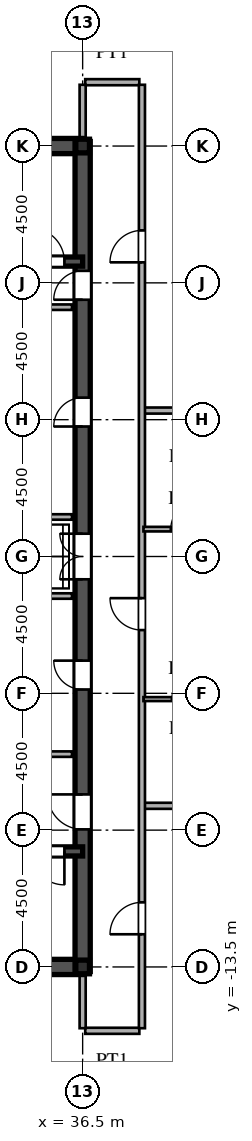
"""IFC4 building model, lengths in metres.
Left out: names, types, materials, properties, quantities, classifications, styles, units other than length and angle.
Written with IfcOpenShell. Run it as: python <this file> out.ifc"""

import sys

from ifc_helpers import new_model, si_unit, direction, frame, frame_2d, origin, origin_2d, place, context, subcontext, project, spatial, rectangle, i_section, extrude, source, transform, mapped, element, fill, save


model = new_model("IFC4")
c1 = context("Model", 3, precision=1e-05, world=origin(), true_north=direction((0.0, 1.0)))
c2 = subcontext(c1, "Body", "Model", "MODEL_VIEW")
j1 = project(units=[si_unit("LENGTHUNIT", "METRE"), si_unit("PLANEANGLEUNIT", "RADIAN")], contexts=[c1])
p1 = place(None, origin())
s1 = spatial("IfcSite", under=j1, at=p1, CompositionType="ELEMENT")
p2 = place(p1, origin())
s2 = spatial("IfcBuilding", under=s1, at=p2, CompositionType="ELEMENT")
p3 = place(p2, frame((0.0, 0.0, 246.9)))
s3 = spatial("IfcBuildingStorey", under=s2, at=p3, CompositionType="ELEMENT", Elevation=246.9)
m1 = source(origin(), c2, "Body", "SweptSolid", [
    extrude(i_section(OverallWidth=0.45, OverallDepth=0.45, WebThickness=0.016, FlangeThickness=0.025, at=origin_2d()), origin(), (0.0, 0.0, 1.0), 3.75),
])
for number, where, z_axis, x_axis in (
    (1, (36.5, -13.5, 0.0), (0.0, 0.0, 1.0), (1.0, 0.0, 0.0)),
    (2, (36.5, 13.5, 0.0), (0.0, 0.0, 1.0), (1.0, 0.0, 0.0)),
):
    element("IfcColumn", number, at=place(p3, frame(where, z_axis=z_axis, x_axis=x_axis)), inside=s3, PredefinedType="COLUMN", context=c2, shape_type="MappedRepresentation", body=[
        mapped(m1, transform((0.0, 0.0, 0.0), scale=1.0)),
    ])
for number, where, z_axis, x_axis in (
    (3, (27.5, -13.5, 0.0), (0.0, 0.0, 1.0), (1.0, 0.0, 0.0)),
    (4, (27.5, 13.5, 0.0), (0.0, 0.0, 1.0), (1.0, 0.0, 0.0)),
):
    element("IfcWall", number, at=place(p3, frame(where, z_axis=z_axis, x_axis=x_axis)), inside=s3, PredefinedType="SHEAR", context=c2, shape_type="SweptSolid", body=[
        extrude(rectangle(XDim=9.0, YDim=0.5, at=frame_2d((4.5, 0.0))), origin(), (0.0, 0.0, 1.0), 3.53),
    ])
p4 = place(p3, frame((36.5, -13.65, 0.0), z_axis=(0.0, 0.0, 1.0), x_axis=(0.0, 1.0, 0.0)))
e5 = element("IfcWall", 5, at=p4, inside=s3, PredefinedType="SHEAR", context=c2, shape_type="SweptSolid", body=[
    extrude(rectangle(XDim=7.15, YDim=0.5, at=frame_2d((3.575, 0.0))), origin(), (0.0, 0.0, 1.0), 3.53),
])
p5 = place(p4, frame((4.675, 0.0, 0.0)))
e6 = element("IfcOpeningElement", 6, at=p5, cuts=e5, PredefinedType="OPENING", context=c2, shape_type="SweptSolid", body=[
    extrude(rectangle(XDim=1.15, YDim=2.2, at=frame_2d((0.575, 1.1))), frame((0.0, 0.26, 0.0), z_axis=(0.0, -1.0, 0.0), x_axis=(1.0, 0.0, 0.0)), (0.0, 0.0, 1.0), 0.52),
])
p6 = place(p3, frame((36.5, -1.3, 0.0), z_axis=(0.0, 0.0, 1.0), x_axis=(0.0, 1.0, 0.0)))
e7 = element("IfcWall", 7, at=p6, inside=s3, PredefinedType="SHEAR", context=c2, shape_type="SweptSolid", body=[
    extrude(rectangle(XDim=2.6, YDim=0.5, at=frame_2d((1.3, 0.0))), origin(), (0.0, 0.0, 1.0), 3.53),
])
p7 = place(p6, frame((0.55, 0.0, 0.0)))
e8 = element("IfcOpeningElement", 8, at=p7, cuts=e7, PredefinedType="OPENING", context=c2, shape_type="SweptSolid", body=[
    extrude(rectangle(XDim=1.5, YDim=2.3, at=frame_2d((0.75, 1.15))), frame((0.0, 0.26, 0.0), z_axis=(0.0, -1.0, 0.0), x_axis=(1.0, 0.0, 0.0)), (0.0, 0.0, 1.0), 0.52),
])
p8 = place(p3, frame((36.5, 8.2, 0.0), z_axis=(0.0, 0.0, 1.0), x_axis=(0.0, 1.0, 0.0)))
e9 = element("IfcWall", 9, at=p8, inside=s3, PredefinedType="SHEAR", context=c2, shape_type="SweptSolid", body=[
    extrude(rectangle(XDim=5.45, YDim=0.5, at=frame_2d((2.725, 0.0))), origin(), (0.0, 0.0, 1.0), 3.53),
])
p9 = place(p8, frame((0.245, 0.0, 0.0)))
e10 = element("IfcOpeningElement", 10, at=p9, cuts=e9, PredefinedType="OPENING", context=c2, shape_type="SweptSolid", body=[
    extrude(rectangle(XDim=0.95, YDim=2.15, at=frame_2d((0.475, 1.075))), frame((0.0, 0.26, 0.0), z_axis=(0.0, -1.0, 0.0), x_axis=(1.0, 0.0, 0.0)), (0.0, 0.0, 1.0), 0.52),
])
p10 = place(p3, frame((36.5, -6.5, 0.0), z_axis=(0.0, 0.0, 1.0), x_axis=(0.0, 1.0, 0.0)))
e11 = element("IfcWall", 11, at=p10, inside=s3, PredefinedType="SHEAR", context=c2, shape_type="SweptSolid", body=[
    extrude(rectangle(XDim=5.2, YDim=0.5, at=frame_2d((2.6, 0.0))), origin(), (0.0, 0.0, 1.0), 3.53),
])
p11 = place(p10, frame((2.125, 0.0, 0.0)))
e12 = element("IfcOpeningElement", 12, at=p11, cuts=e11, PredefinedType="OPENING", context=c2, shape_type="SweptSolid", body=[
    extrude(rectangle(XDim=0.95, YDim=2.15, at=frame_2d((0.475, 1.075))), frame((0.0, 0.26, 0.0), z_axis=(0.0, -1.0, 0.0), x_axis=(1.0, 0.0, 0.0)), (0.0, 0.0, 1.0), 0.52),
])
p12 = place(p3, frame((36.5, 1.3, 0.0), z_axis=(0.0, 0.0, 1.0), x_axis=(0.0, 1.0, 0.0)))
e13 = element("IfcWall", 13, at=p12, inside=s3, PredefinedType="SHEAR", context=c2, shape_type="SweptSolid", body=[
    extrude(rectangle(XDim=6.9, YDim=0.5, at=frame_2d((3.45, 0.0))), origin(), (0.0, 0.0, 1.0), 3.53),
])
p13 = place(p12, frame((2.975, 0.0, 0.0)))
e14 = element("IfcOpeningElement", 14, at=p13, cuts=e13, PredefinedType="OPENING", context=c2, shape_type="SweptSolid", body=[
    extrude(rectangle(XDim=0.95, YDim=2.15, at=frame_2d((0.475, 1.075))), frame((0.0, 0.26, 0.0), z_axis=(0.0, -1.0, 0.0), x_axis=(1.0, 0.0, 0.0)), (0.0, 0.0, 1.0), 0.52),
])
p14 = place(p3, frame((27.5, -9.7, 0.0), z_axis=(0.0, 0.0, 1.0), x_axis=(1.0, 0.0, 0.0)))
e15 = element("IfcWall", 15, at=p14, inside=s3, PredefinedType="SHEAR", context=c2, shape_type="SweptSolid", body=[
    extrude(rectangle(XDim=9.0, YDim=0.3, at=frame_2d((4.5, 0.0))), origin(), (0.0, 0.0, 1.0), 3.53),
])
p15 = place(p14, frame((7.3, 0.0, 0.0)))
e16 = element("IfcOpeningElement", 16, at=p15, cuts=e15, PredefinedType="OPENING", context=c2, shape_type="SweptSolid", body=[
    extrude(rectangle(XDim=1.1, YDim=2.2, at=frame_2d((0.55, 1.1))), frame((0.0, 0.16, 0.0), z_axis=(0.0, -1.0, 0.0), x_axis=(1.0, 0.0, 0.0)), (0.0, 0.0, 1.0), 0.32),
])
p16 = place(p3, frame((27.5, 9.7, 0.0), z_axis=(0.0, 0.0, 1.0), x_axis=(1.0, 0.0, 0.0)))
e17 = element("IfcWall", 17, at=p16, inside=s3, PredefinedType="SHEAR", context=c2, shape_type="SweptSolid", body=[
    extrude(rectangle(XDim=9.0, YDim=0.3, at=frame_2d((4.5, 0.0))), origin(), (0.0, 0.0, 1.0), 3.53),
])
p17 = place(p16, frame((7.3, 0.0, 0.0)))
e18 = element("IfcOpeningElement", 18, at=p17, cuts=e17, PredefinedType="OPENING", context=c2, shape_type="SweptSolid", body=[
    extrude(rectangle(XDim=1.1, YDim=2.2, at=frame_2d((0.55, 1.1))), frame((0.0, 0.16, 0.0), z_axis=(0.0, -1.0, 0.0), x_axis=(1.0, 0.0, 0.0)), (0.0, 0.0, 1.0), 0.32),
])
for number, where, z_axis, x_axis in (
    (19, (30.45, -6.5, 0.0), (0.0, 0.0, 1.0), (1.0, 0.0, 0.0)),
    (20, (30.45, 8.2, 0.0), (0.0, 0.0, 1.0), (1.0, 0.0, 0.0)),
):
    element("IfcWall", number, at=place(p3, frame(where, z_axis=z_axis, x_axis=x_axis)), inside=s3, PredefinedType="PARTITIONING", context=c2, shape_type="SweptSolid", body=[
        extrude(rectangle(XDim=5.7, YDim=0.18, at=frame_2d((2.85, 0.0))), origin(), (0.0, 0.0, 1.0), 3.53),
    ])
for number, where, z_axis, x_axis in (
    (21, (33.2, -1.3, 0.0), (0.0, 0.0, 1.0), (1.0, 0.0, 0.0)),
    (22, (33.2, 1.3, 0.0), (0.0, 0.0, 1.0), (1.0, 0.0, 0.0)),
):
    element("IfcWall", number, at=place(p3, frame(where, z_axis=z_axis, x_axis=x_axis)), inside=s3, PredefinedType="PARTITIONING", context=c2, shape_type="SweptSolid", body=[
        extrude(rectangle(XDim=2.95, YDim=0.18, at=frame_2d((1.475, 0.0))), origin(), (0.0, 0.0, 1.0), 3.53),
    ])
p18 = place(p3, frame((36.585, -15.6, 0.0), z_axis=(0.0, 0.0, 1.0), x_axis=(1.0, 0.0, 0.0)))
e23 = element("IfcWall", 23, at=p18, inside=s3, PredefinedType="PARTITIONING", context=c2, shape_type="SweptSolid", body=[
    extrude(rectangle(XDim=1.78, YDim=0.2, at=frame_2d((0.89, 0.0))), origin(), (0.0, 0.0, 1.0), 3.53),
])
p19 = place(p3, frame((38.53, -8.2, 0.0), z_axis=(0.0, 0.0, 1.0), x_axis=(1.0, 0.0, 0.0)))
e24 = element("IfcWall", 24, at=p19, inside=s3, PredefinedType="PARTITIONING", context=c2, shape_type="SweptSolid", body=[
    extrude(rectangle(XDim=17.813, YDim=0.2, at=frame_2d((8.906, 0.0))), origin(), (0.0, 0.0, 1.0), 3.53),
])
p20 = place(p3, frame((38.5, -4.69, 0.0), z_axis=(0.0, 0.0, 1.0), x_axis=(1.0, 0.0, 0.0)))
e25 = element("IfcWall", 25, at=p20, inside=s3, PredefinedType="PARTITIONING", context=c2, shape_type="SweptSolid", body=[
    extrude(rectangle(XDim=2.75, YDim=0.13, at=frame_2d((1.375, 0.0))), origin(), (0.0, 0.0, 1.0), 3.53),
])
p21 = place(p20, frame((0.935, 0.0, 0.0)))
e26 = element("IfcOpeningElement", 26, at=p21, cuts=e25, PredefinedType="OPENING", context=c2, shape_type="SweptSolid", body=[
    extrude(rectangle(XDim=0.88, YDim=2.1, at=frame_2d((0.44, 1.05))), frame((0.0, 0.075, 0.0), z_axis=(0.0, -1.0, 0.0), x_axis=(1.0, 0.0, 0.0)), (0.0, 0.0, 1.0), 0.15),
])
p22 = place(p3, frame((38.5, 0.9, 0.0), z_axis=(0.0, 0.0, 1.0), x_axis=(1.0, 0.0, 0.0)))
e27 = element("IfcWall", 27, at=p22, inside=s3, PredefinedType="PARTITIONING", context=c2, shape_type="SweptSolid", body=[
    extrude(rectangle(XDim=2.75, YDim=0.15, at=frame_2d((1.375, 0.0))), origin(), (0.0, 0.0, 1.0), 3.53),
])
p23 = place(p22, frame((0.9, 0.0, 0.0)))
e28 = element("IfcOpeningElement", 28, at=p23, cuts=e27, PredefinedType="OPENING", context=c2, shape_type="SweptSolid", body=[
    extrude(rectangle(XDim=0.95, YDim=2.15, at=frame_2d((0.475, 1.075))), frame((0.0, 0.085, 0.0), z_axis=(0.0, -1.0, 0.0), x_axis=(1.0, 0.0, 0.0)), (0.0, 0.0, 1.0), 0.17),
])
p24 = place(p3, frame((38.53, 4.8, 0.0), z_axis=(0.0, 0.0, 1.0), x_axis=(1.0, 0.0, 0.0)))
e29 = element("IfcWall", 29, at=p24, inside=s3, PredefinedType="PARTITIONING", context=c2, shape_type="SweptSolid", body=[
    extrude(rectangle(XDim=23.48, YDim=0.2, at=frame_2d((11.74, 0.0))), origin(), (0.0, 0.0, 1.0), 3.53),
])
p25 = place(p3, frame((36.585, 15.6, 0.0), z_axis=(0.0, 0.0, 1.0), x_axis=(1.0, 0.0, 0.0)))
e30 = element("IfcWall", 30, at=p25, inside=s3, PredefinedType="PARTITIONING", context=c2, shape_type="SweptSolid", body=[
    extrude(rectangle(XDim=1.78, YDim=0.2, at=frame_2d((0.89, 0.0))), origin(), (0.0, 0.0, 1.0), 3.53),
])
for number, where, z_axis, x_axis in (
    (31, (36.5, -15.515, 0.0), (0.0, 0.0, 1.0), (0.0, 1.0, 0.0)),
    (32, (36.5, 13.755, 0.0), (0.0, 0.0, 1.0), (0.0, 1.0, 0.0)),
):
    element("IfcWall", number, at=place(p3, frame(where, z_axis=z_axis, x_axis=x_axis)), inside=s3, PredefinedType="PARTITIONING", context=c2, shape_type="SweptSolid", body=[
        extrude(rectangle(XDim=1.76, YDim=0.2, at=frame_2d((0.88, 0.0))), origin(), (0.0, 0.0, 1.0), 2.93),
    ])
p26 = place(p3, frame((38.45, -15.515, 0.0), z_axis=(0.0, 0.0, 1.0), x_axis=(0.0, 1.0, 0.0)))
e33 = element("IfcWall", 33, at=p26, inside=s3, PredefinedType="PARTITIONING", context=c2, shape_type="SweptSolid", body=[
    extrude(rectangle(XDim=31.03, YDim=0.2, at=frame_2d((15.515, 0.0))), origin(), (0.0, 0.0, 1.0), 3.53),
])
p27 = place(p26, frame((3.09, 0.0, 0.0)))
e34 = element("IfcOpeningElement", 34, at=p27, cuts=e33, PredefinedType="OPENING", context=c2, shape_type="SweptSolid", body=[
    extrude(rectangle(XDim=1.05, YDim=2.25, at=frame_2d((0.525, 1.125))), frame((0.0, 0.11, 0.0), z_axis=(0.0, -1.0, 0.0), x_axis=(1.0, 0.0, 0.0)), (0.0, 0.0, 1.0), 0.22),
])
p28 = place(p26, frame((13.095, 0.0, 0.0)))
e35 = element("IfcOpeningElement", 35, at=p28, cuts=e33, PredefinedType="OPENING", context=c2, shape_type="SweptSolid", body=[
    extrude(rectangle(XDim=1.05, YDim=2.25, at=frame_2d((0.525, 1.125))), frame((0.0, 0.11, 0.0), z_axis=(0.0, -1.0, 0.0), x_axis=(1.0, 0.0, 0.0)), (0.0, 0.0, 1.0), 0.22),
])
p29 = place(p26, frame((25.19, 0.0, 0.0)))
e36 = element("IfcOpeningElement", 36, at=p29, cuts=e33, PredefinedType="OPENING", context=c2, shape_type="SweptSolid", body=[
    extrude(rectangle(XDim=1.05, YDim=2.25, at=frame_2d((0.525, 1.125))), frame((0.0, 0.11, 0.0), z_axis=(0.0, -1.0, 0.0), x_axis=(1.0, 0.0, 0.0)), (0.0, 0.0, 1.0), 0.22),
])
m2 = source(origin(), c2, "Body", "SweptSolid", [
    extrude(rectangle(XDim=1.15, YDim=2.2, at=frame_2d((0.575, 1.1))), frame((0.0, 0.025, 0.0), z_axis=(0.0, -1.0, 0.0), x_axis=(1.0, 0.0, 0.0)), (0.0, 0.0, 1.0), 0.05),
])
p30 = place(p5, origin())
e37 = element("IfcDoor", 37, at=p30, inside=s3, OperationType="SINGLE_SWING_RIGHT", PredefinedType="DOOR", context=c2, shape_type="MappedRepresentation", body=[
    mapped(m2, transform((0.0, 0.0, 0.0), scale=1.0)),
])
fill(e6, e37)
m3 = source(origin(), c2, "Body", "SweptSolid", [
    extrude(rectangle(XDim=1.5, YDim=2.3, at=frame_2d((0.75, 1.15))), frame((0.0, 0.025, 0.0), z_axis=(0.0, -1.0, 0.0), x_axis=(1.0, 0.0, 0.0)), (0.0, 0.0, 1.0), 0.05),
])
p31 = place(p7, origin())
e38 = element("IfcDoor", 38, at=p31, inside=s3, OperationType="DOUBLE_SWING_LEFT", PredefinedType="DOOR", context=c2, shape_type="MappedRepresentation", body=[
    mapped(m3, transform((0.0, 0.0, 0.0), scale=1.0)),
])
fill(e8, e38)
m4 = source(origin(), c2, "Body", "SweptSolid", [
    extrude(rectangle(XDim=0.95, YDim=2.15, at=frame_2d((0.475, 1.075))), frame((0.0, 0.025, 0.0), z_axis=(0.0, -1.0, 0.0), x_axis=(1.0, 0.0, 0.0)), (0.0, 0.0, 1.0), 0.05),
])
p32 = place(p9, origin())
e39 = element("IfcDoor", 39, at=p32, inside=s3, OperationType="SINGLE_SWING_LEFT", PredefinedType="DOOR", context=c2, shape_type="MappedRepresentation", body=[
    mapped(m4, transform((0.0, 0.0, 0.0), scale=1.0)),
])
fill(e10, e39)
p33 = place(p11, origin())
e40 = element("IfcDoor", 40, at=p33, inside=s3, OperationType="SINGLE_SWING_RIGHT", PredefinedType="DOOR", context=c2, shape_type="MappedRepresentation", body=[
    mapped(m4, transform((0.0, 0.0, 0.0), scale=1.0)),
])
fill(e12, e40)
p34 = place(p13, origin())
e41 = element("IfcDoor", 41, at=p34, inside=s3, OperationType="SINGLE_SWING_LEFT", PredefinedType="DOOR", context=c2, shape_type="MappedRepresentation", body=[
    mapped(m4, transform((0.0, 0.0, 0.0), scale=1.0)),
])
fill(e14, e41)
m5 = source(origin(), c2, "Body", "SweptSolid", [
    extrude(rectangle(XDim=1.1, YDim=2.2, at=frame_2d((0.55, 1.1))), frame((0.0, 0.025, 0.0), z_axis=(0.0, -1.0, 0.0), x_axis=(1.0, 0.0, 0.0)), (0.0, 0.0, 1.0), 0.05),
])
p35 = place(p15, frame((1.1, 0.0, 0.0), z_axis=(0.0, 0.0, 1.0), x_axis=(-1.0, 0.0, 0.0)))
e42 = element("IfcDoor", 42, at=p35, inside=s3, OperationType="SINGLE_SWING_RIGHT", PredefinedType="DOOR", context=c2, shape_type="MappedRepresentation", body=[
    mapped(m5, transform((0.0, 0.0, 0.0), scale=1.0)),
])
fill(e16, e42)
p36 = place(p17, origin())
e43 = element("IfcDoor", 43, at=p36, inside=s3, OperationType="SINGLE_SWING_LEFT", PredefinedType="DOOR", context=c2, shape_type="MappedRepresentation", body=[
    mapped(m5, transform((0.0, 0.0, 0.0), scale=1.0)),
])
fill(e18, e43)
m6 = source(origin(), c2, "Body", "SweptSolid", [
    extrude(rectangle(XDim=0.88, YDim=2.1, at=frame_2d((0.44, 1.05))), frame((0.0, 0.025, 0.0), z_axis=(0.0, -1.0, 0.0), x_axis=(1.0, 0.0, 0.0)), (0.0, 0.0, 1.0), 0.05),
])
p37 = place(p21, origin())
e44 = element("IfcDoor", 44, at=p37, inside=s3, OperationType="SINGLE_SWING_RIGHT", PredefinedType="DOOR", context=c2, shape_type="MappedRepresentation", body=[
    mapped(m6, transform((0.0, 0.0, 0.0), scale=1.0)),
])
fill(e26, e44)
m7 = source(origin(), c2, "Body", "SweptSolid", [
    extrude(rectangle(XDim=0.95, YDim=2.15, at=frame_2d((0.475, 1.075))), frame((0.0, 0.025, 0.0), z_axis=(0.0, -1.0, 0.0), x_axis=(1.0, 0.0, 0.0)), (0.0, 0.0, 1.0), 0.05),
])
p38 = place(p23, origin())
e45 = element("IfcDoor", 45, at=p38, inside=s3, OperationType="SINGLE_SWING_RIGHT", PredefinedType="DOOR", context=c2, shape_type="MappedRepresentation", body=[
    mapped(m7, transform((0.0, 0.0, 0.0), scale=1.0)),
])
fill(e28, e45)
m8 = source(origin(), c2, "Body", "SweptSolid", [
    extrude(rectangle(XDim=1.05, YDim=2.25, at=frame_2d((0.525, 1.125))), frame((0.0, 0.025, 0.0), z_axis=(0.0, -1.0, 0.0), x_axis=(1.0, 0.0, 0.0)), (0.0, 0.0, 1.0), 0.05),
])
p39 = place(p27, origin())
e46 = element("IfcDoor", 46, at=p39, inside=s3, OperationType="SINGLE_SWING_LEFT", PredefinedType="DOOR", context=c2, shape_type="MappedRepresentation", body=[
    mapped(m8, transform((0.0, 0.0, 0.0), scale=1.0)),
])
fill(e34, e46)
p40 = place(p28, origin())
e47 = element("IfcDoor", 47, at=p40, inside=s3, OperationType="SINGLE_SWING_RIGHT", PredefinedType="DOOR", context=c2, shape_type="MappedRepresentation", body=[
    mapped(m8, transform((0.0, 0.0, 0.0), scale=1.0)),
])
fill(e35, e47)
p41 = place(p29, origin())
e48 = element("IfcDoor", 48, at=p41, inside=s3, OperationType="SINGLE_SWING_LEFT", PredefinedType="DOOR", context=c2, shape_type="MappedRepresentation", body=[
    mapped(m8, transform((0.0, 0.0, 0.0), scale=1.0)),
])
fill(e36, e48)
save(model, sys.argv[1])
